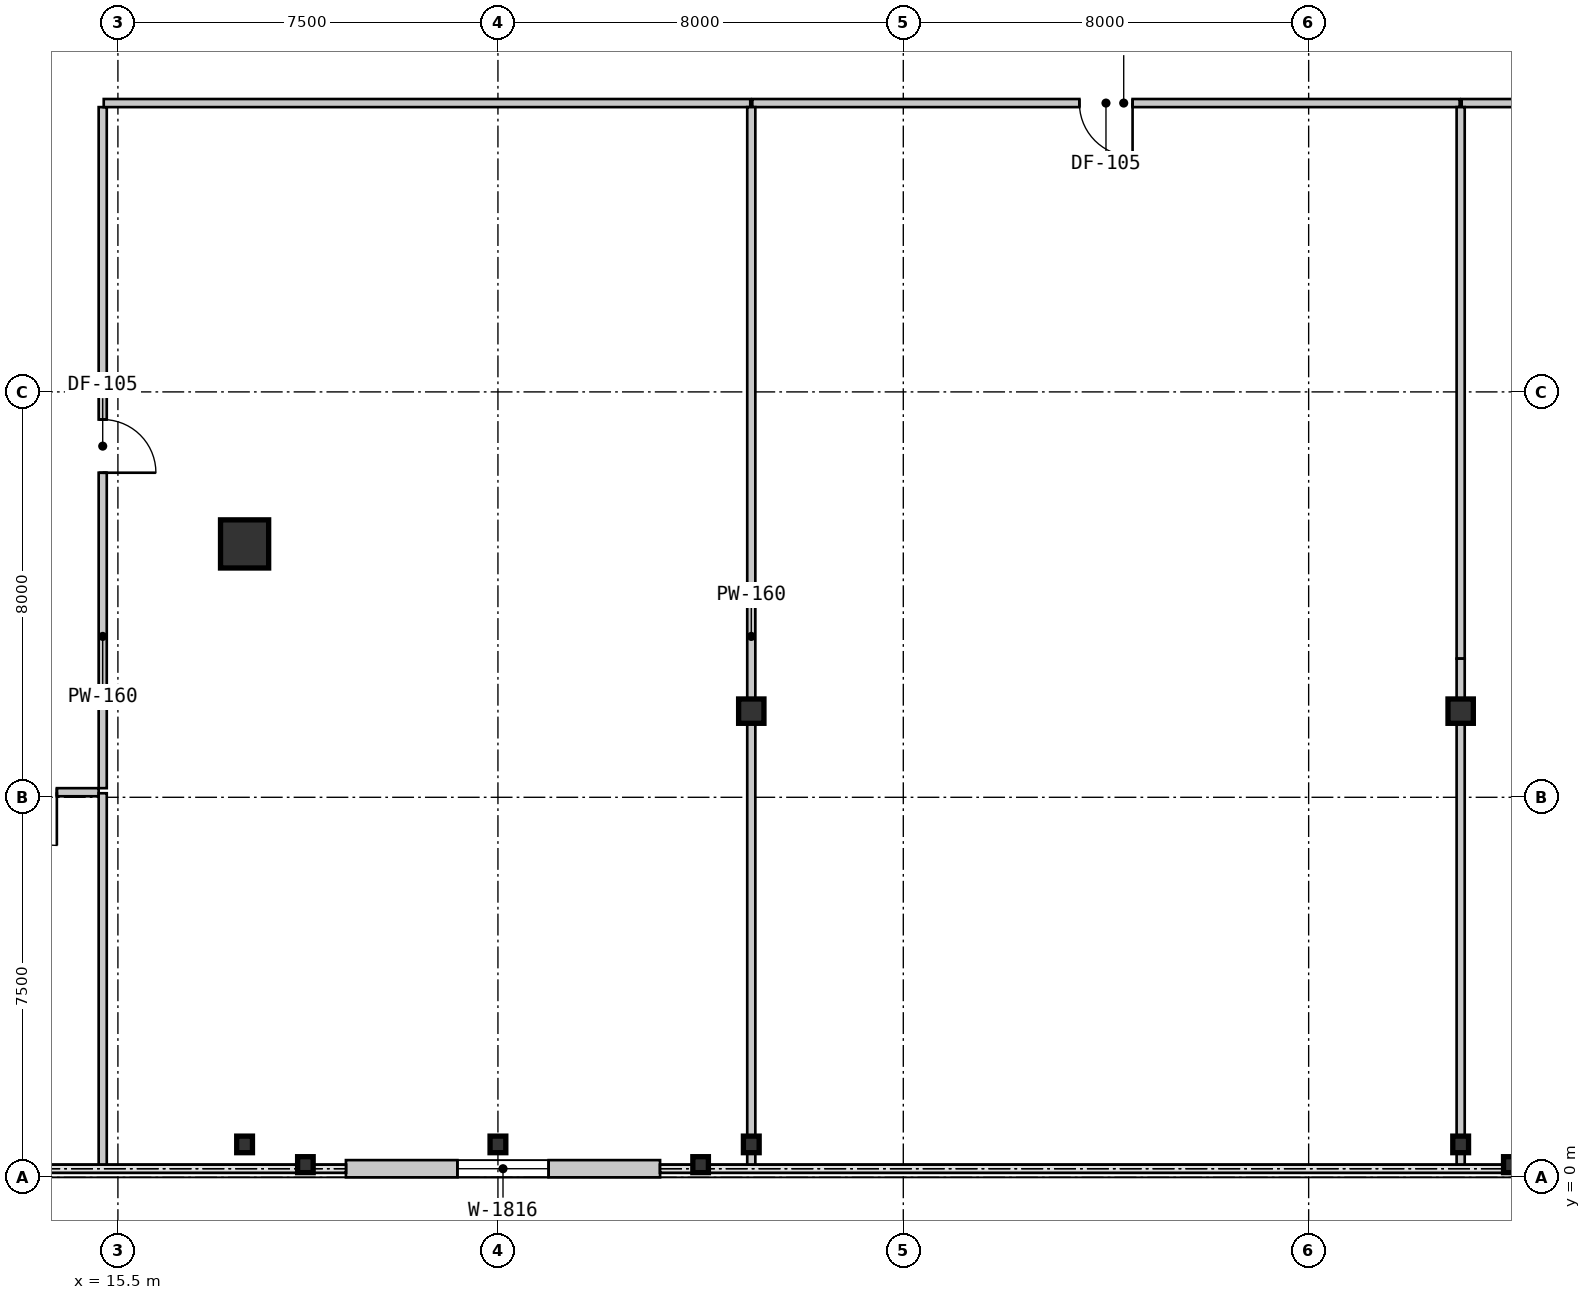
"""IFC4 building model, lengths in metres.
Left out: names, types, materials, properties, quantities, classifications, styles, units other than length and angle.
Written with IfcOpenShell. Run it as: python <this file> out.ifc"""

import sys

from ifc_helpers import new_model, si_unit, direction, frame, frame_2d, origin, origin_2d, place, context, subcontext, project, spatial, rectangle, i_section, extrude, source, transform, mapped, element, fill, save


model = new_model("IFC4")
c1 = context("Model", 3, precision=1e-05, world=origin(), true_north=direction((0.0, 1.0)))
c2 = subcontext(c1, "Body", "Model", "MODEL_VIEW")
j1 = project(units=[si_unit("LENGTHUNIT", "METRE"), si_unit("PLANEANGLEUNIT", "RADIAN")], contexts=[c1])
p1 = place(None, origin())
s1 = spatial("IfcSite", under=j1, at=p1, CompositionType="ELEMENT")
p2 = place(p1, origin())
s2 = spatial("IfcBuilding", under=s1, at=p2, CompositionType="ELEMENT")
p3 = place(p2, frame((0.0, 0.0, 4.55)))
s3 = spatial("IfcBuildingStorey", under=s2, at=p3, CompositionType="ELEMENT", Elevation=4.55)
m1 = source(origin(), c2, "Body", "SweptSolid", [
    extrude(i_section(OverallWidth=0.5, OverallDepth=0.48, WebThickness=0.028, FlangeThickness=0.044, at=origin_2d()), origin(), (0.0, 0.0, 1.0), 3.85),
])
for number, where, z_axis, x_axis in (
    (1, (28.0, 9.2, 0.0), (0.0, 0.0, 1.0), (1.0, 0.0, 0.0)),
    (2, (42.0, 9.2, 0.0), (0.0, 0.0, 1.0), (1.0, 0.0, 0.0)),
):
    element("IfcColumn", number, at=place(p3, frame(where, z_axis=z_axis, x_axis=x_axis)), inside=s3, PredefinedType="COLUMN", context=c2, shape_type="MappedRepresentation", body=[
        mapped(m1, transform((0.0, 0.0, 0.0), scale=1.0)),
    ])
m2 = source(origin(), c2, "Body", "SweptSolid", [
    extrude(rectangle(XDim=0.95, YDim=0.95, at=origin_2d()), origin(), (0.0, 0.0, 1.0), 3.85),
])
p4 = place(p3, frame((18.0, 12.5, 0.0), z_axis=(0.0, 0.0, 1.0), x_axis=(1.0, 0.0, 0.0)))
e3 = element("IfcColumn", 3, at=p4, inside=s3, PredefinedType="COLUMN", context=c2, shape_type="MappedRepresentation", body=[
    mapped(m2, transform((0.0, 0.0, 0.0), scale=1.0)),
])
m3 = source(origin(), c2, "Body", "SweptSolid", [
    extrude(i_section(OverallWidth=0.311, OverallDepth=0.327, WebThickness=0.016, FlangeThickness=0.025, at=origin_2d()), origin(), (0.0, 0.0, 1.0), 3.85),
])
for number, where, z_axis, x_axis in (
    (4, (28.0, 0.65, 0.0), (0.0, 0.0, 1.0), (1.0, 0.0, 0.0)),
    (5, (42.0, 0.65, 0.0), (0.0, 0.0, 1.0), (1.0, 0.0, 0.0)),
    (6, (18.0, 0.65, 0.0), (0.0, 0.0, 1.0), (1.0, 0.0, 0.0)),
    (7, (23.0, 0.65, 0.0), (0.0, 0.0, 1.0), (1.0, 0.0, 0.0)),
):
    element("IfcColumn", number, at=place(p3, frame(where, z_axis=z_axis, x_axis=x_axis)), inside=s3, PredefinedType="COLUMN", context=c2, shape_type="MappedRepresentation", body=[
        mapped(m3, transform((0.0, 0.0, 0.0), scale=1.0)),
    ])
m4 = source(origin(), c2, "Body", "SweptSolid", [
    extrude(i_section(OverallWidth=0.307, OverallDepth=0.315, WebThickness=0.012, FlangeThickness=0.019, at=origin_2d()), origin(), (0.0, 0.0, 1.0), 3.85),
])
for number, where, z_axis, x_axis in (
    (8, (19.2, 0.25, 0.0), (0.0, 0.0, 1.0), (1.0, 0.0, 0.0)),
    (9, (27.0, 0.25, 0.0), (0.0, 0.0, 1.0), (1.0, 0.0, 0.0)),
    (10, (43.0, 0.25, 0.0), (0.0, 0.0, 1.0), (1.0, 0.0, 0.0)),
):
    element("IfcColumn", number, at=place(p3, frame(where, z_axis=z_axis, x_axis=x_axis)), inside=s3, PredefinedType="PILASTER", context=c2, shape_type="MappedRepresentation", body=[
        mapped(m4, transform((0.0, 0.0, 0.0), scale=1.0)),
    ])
m5 = source(origin(), c2, "Body", "SweptSolid", [
    extrude(rectangle(XDim=6.2, YDim=0.34, at=frame_2d((3.1, 0.0))), origin(), (0.0, 0.0, 1.0), 3.59),
])
p5 = place(p3, frame((20.0, 0.17, 0.0), z_axis=(0.0, 0.0, 1.0), x_axis=(1.0, 0.0, 0.0)))
e11 = element("IfcWall", 11, at=p5, inside=s3, PredefinedType="SOLIDWALL", context=c2, shape_type="MappedRepresentation", body=[
    mapped(m5, transform((0.0, 0.0, 0.0), scale=1.0)),
])
m6 = source(origin(), c2, "Body", "SweptSolid", [
    extrude(rectangle(XDim=1.8, YDim=1.6, at=frame_2d((0.9, 0.8))), frame((0.0, 0.18, 0.0), z_axis=(0.0, -1.0, 0.0), x_axis=(1.0, 0.0, 0.0)), (0.0, 0.0, 1.0), 0.36),
])
p6 = place(p5, frame((2.2, 0.0, 0.9)))
e12 = element("IfcOpeningElement", 12, at=p6, cuts=e11, PredefinedType="OPENING", context=c2, shape_type="MappedRepresentation", body=[
    mapped(m6, transform((0.0, 0.0, 0.0), scale=1.0)),
])
m7 = source(origin(), c2, "Body", "SweptSolid", [
    extrude(rectangle(XDim=13.44, YDim=0.16, at=frame_2d((6.72, 0.0))), origin(), (0.0, 0.0, 1.0), 3.59),
])
p7 = place(p3, frame((15.2, 21.12, 0.0), z_axis=(0.0, 0.0, 1.0), x_axis=(0.0, -1.0, 0.0)))
e13 = element("IfcWall", 13, at=p7, inside=s3, PredefinedType="PARTITIONING", context=c2, shape_type="MappedRepresentation", body=[
    mapped(m7, transform((0.0, 0.0, 0.0), scale=1.0)),
])
m8 = source(origin(), c2, "Body", "SweptSolid", [
    extrude(rectangle(XDim=1.05, YDim=2.1, at=frame_2d((0.525, 1.05))), frame((0.0, 0.09, 0.0), z_axis=(0.0, -1.0, 0.0), x_axis=(1.0, 0.0, 0.0)), (0.0, 0.0, 1.0), 0.18),
])
p8 = place(p7, frame((6.165, 0.0, 0.0)))
e14 = element("IfcOpeningElement", 14, at=p8, cuts=e13, PredefinedType="OPENING", context=c2, shape_type="MappedRepresentation", body=[
    mapped(m8, transform((0.0, 0.0, 0.0), scale=1.0)),
])
m9 = source(origin(), c2, "Body", "SweptSolid", [
    extrude(rectangle(XDim=12.76, YDim=0.16, at=frame_2d((6.38, 0.0))), origin(), (0.0, 0.0, 1.0), 3.59),
])
p9 = place(p3, frame((27.98, 21.2, 0.0), z_axis=(0.0, 0.0, 1.0), x_axis=(-1.0, 0.0, 0.0)))
e15 = element("IfcWall", 15, at=p9, inside=s3, PredefinedType="PARTITIONING", context=c2, shape_type="MappedRepresentation", body=[
    mapped(m9, transform((0.0, 0.0, 0.0), scale=1.0)),
])
m10 = source(origin(), c2, "Body", "SweptSolid", [
    extrude(rectangle(XDim=13.959, YDim=0.16, at=frame_2d((6.98, 0.0))), origin(), (0.0, 0.0, 1.0), 3.59),
])
p10 = place(p3, frame((41.98, 21.2, 0.0), z_axis=(0.0, 0.0, 1.0), x_axis=(-1.0, 0.0, 0.0)))
e16 = element("IfcWall", 16, at=p10, inside=s3, PredefinedType="PARTITIONING", context=c2, shape_type="MappedRepresentation", body=[
    mapped(m10, transform((0.0, 0.0, 0.0), scale=1.0)),
])
p11 = place(p10, frame((6.455, 0.0, 0.0)))
e17 = element("IfcOpeningElement", 17, at=p11, cuts=e16, PredefinedType="OPENING", context=c2, shape_type="MappedRepresentation", body=[
    mapped(m8, transform((0.0, 0.0, 0.0), scale=1.0)),
])
m11 = source(origin(), c2, "Body", "SweptSolid", [
    extrude(rectangle(XDim=13.459, YDim=0.16, at=frame_2d((6.73, 0.0))), origin(), (0.0, 0.0, 1.0), 3.59),
])
p12 = place(p3, frame((55.48, 21.2, 0.0), z_axis=(0.0, 0.0, 1.0), x_axis=(-1.0, 0.0, 0.0)))
e18 = element("IfcWall", 18, at=p12, inside=s3, PredefinedType="PARTITIONING", context=c2, shape_type="MappedRepresentation", body=[
    mapped(m11, transform((0.0, 0.0, 0.0), scale=1.0)),
])
m12 = source(origin(), c2, "Body", "SweptSolid", [
    extrude(rectangle(XDim=2.67, YDim=0.16, at=frame_2d((1.335, 0.0))), origin(), (0.0, 0.0, 1.0), 3.59),
])
p13 = place(p3, frame((15.12, 7.6, 0.0), z_axis=(0.0, 0.0, 1.0), x_axis=(-1.0, 0.0, 0.0)))
e19 = element("IfcWall", 19, at=p13, inside=s3, PredefinedType="PARTITIONING", context=c2, shape_type="MappedRepresentation", body=[
    mapped(m12, transform((0.0, 0.0, 0.0), scale=1.0)),
])
p14 = place(p13, frame((0.825, 0.0, 0.0)))
e20 = element("IfcOpeningElement", 20, at=p14, cuts=e19, PredefinedType="OPENING", context=c2, shape_type="MappedRepresentation", body=[
    mapped(m8, transform((0.0, 0.0, 0.0), scale=1.0)),
])
m13 = source(origin(), c2, "Body", "SweptSolid", [
    extrude(rectangle(XDim=11.92, YDim=0.16, at=frame_2d((5.96, 0.0))), origin(), (0.0, 0.0, 1.0), 2.988),
])
p15 = place(p3, frame((28.0, 21.12, 0.0), z_axis=(0.0, 0.0, 1.0), x_axis=(0.0, -1.0, 0.0)))
e21 = element("IfcWall", 21, at=p15, inside=s3, PredefinedType="PARTITIONING", context=c2, shape_type="MappedRepresentation", body=[
    mapped(m13, transform((0.0, 0.0, 0.0), scale=1.0)),
])
m14 = source(origin(), c2, "Body", "SweptSolid", [
    extrude(rectangle(XDim=8.55, YDim=0.16, at=frame_2d((4.275, 0.0))), origin(), (0.0, 0.0, 1.0), 3.057),
])
p16 = place(p3, frame((28.0, 9.2, 0.0), z_axis=(0.0, 0.0, 1.0), x_axis=(0.0, -1.0, 0.0)))
e22 = element("IfcWall", 22, at=p16, inside=s3, PredefinedType="PARTITIONING", context=c2, shape_type="MappedRepresentation", body=[
    mapped(m14, transform((0.0, 0.0, 0.0), scale=1.0)),
])
m15 = source(origin(), c2, "Body", "SweptSolid", [
    extrude(rectangle(XDim=0.42, YDim=0.16, at=frame_2d((0.21, 0.0))), origin(), (0.0, 0.0, 1.0), 3.59),
])
p17 = place(p3, frame((28.0, 0.65, 0.0), z_axis=(0.0, 0.0, 1.0), x_axis=(0.0, -1.0, 0.0)))
e23 = element("IfcWall", 23, at=p17, inside=s3, PredefinedType="PARTITIONING", context=c2, shape_type="MappedRepresentation", body=[
    mapped(m15, transform((0.0, 0.0, 0.0), scale=1.0)),
])
m16 = source(origin(), c2, "Body", "SweptSolid", [
    extrude(rectangle(XDim=7.35, YDim=0.16, at=frame_2d((3.675, 0.0))), origin(), (0.0, 0.0, 1.0), 3.59),
])
p18 = place(p3, frame((15.2, 0.23, 0.0), z_axis=(0.0, 0.0, 1.0), x_axis=(0.0, 1.0, 0.0)))
e24 = element("IfcWall", 24, at=p18, inside=s3, PredefinedType="PARTITIONING", context=c2, shape_type="MappedRepresentation", body=[
    mapped(m16, transform((0.0, 0.0, 0.0), scale=1.0)),
])
m17 = source(origin(), c2, "Body", "SweptSolid", [
    extrude(rectangle(XDim=10.884, YDim=0.16, at=frame_2d((5.442, 0.0))), origin(), (0.0, 0.0, 1.0), 3.59),
])
p19 = place(p3, frame((42.0, 21.12, 0.0), z_axis=(0.0, 0.0, 1.0), x_axis=(0.0, -1.0, 0.0)))
e25 = element("IfcWall", 25, at=p19, inside=s3, PredefinedType="PARTITIONING", context=c2, shape_type="MappedRepresentation", body=[
    mapped(m17, transform((0.0, 0.0, 0.0), scale=1.0)),
])
m18 = source(origin(), c2, "Body", "SweptSolid", [
    extrude(rectangle(XDim=1.051, YDim=0.16, at=frame_2d((0.526, 0.0))), origin(), (0.0, 0.0, 1.0), 2.988),
])
p20 = place(p3, frame((42.0, 10.236, 0.0), z_axis=(0.0, 0.0, 1.0), x_axis=(0.0, -1.0, 0.0)))
e26 = element("IfcWall", 26, at=p20, inside=s3, PredefinedType="PARTITIONING", context=c2, shape_type="MappedRepresentation", body=[
    mapped(m18, transform((0.0, 0.0, 0.0), scale=1.0)),
])
m19 = source(origin(), c2, "Body", "SweptSolid", [
    extrude(rectangle(XDim=8.535, YDim=0.16, at=frame_2d((4.268, 0.0))), origin(), (0.0, 0.0, 1.0), 3.057),
])
p21 = place(p3, frame((42.0, 9.185, 0.0), z_axis=(0.0, 0.0, 1.0), x_axis=(0.0, -1.0, 0.0)))
e27 = element("IfcWall", 27, at=p21, inside=s3, PredefinedType="PARTITIONING", context=c2, shape_type="MappedRepresentation", body=[
    mapped(m19, transform((0.0, 0.0, 0.0), scale=1.0)),
])
p22 = place(p3, frame((42.0, 0.65, 0.0), z_axis=(0.0, 0.0, 1.0), x_axis=(0.0, -1.0, 0.0)))
e28 = element("IfcWall", 28, at=p22, inside=s3, PredefinedType="PARTITIONING", context=c2, shape_type="MappedRepresentation", body=[
    mapped(m15, transform((0.0, 0.0, 0.0), scale=1.0)),
])
m20 = source(origin(), c2, "Body", "SweptSolid", [
    extrude(rectangle(XDim=1.8, YDim=1.6, at=frame_2d((0.9, 0.8))), frame((0.0, 0.03, 0.0), z_axis=(0.0, -1.0, 0.0), x_axis=(1.0, 0.0, 0.0)), (0.0, 0.0, 1.0), 0.06),
])
p23 = place(p6, origin())
e29 = element("IfcWindow", 29, at=p23, inside=s3, PartitioningType="SINGLE_PANEL", PredefinedType="WINDOW", context=c2, shape_type="MappedRepresentation", body=[
    mapped(m20, transform((0.0, 0.0, 0.0), scale=1.0)),
])
fill(e12, e29)
m21 = source(origin(), c2, "Body", "SweptSolid", [
    extrude(rectangle(XDim=1.05, YDim=2.1, at=frame_2d((0.525, 1.05))), frame((0.0, 0.025, 0.0), z_axis=(0.0, -1.0, 0.0), x_axis=(1.0, 0.0, 0.0)), (0.0, 0.0, 1.0), 0.05),
])
p24 = place(p8, origin())
e30 = element("IfcDoor", 30, at=p24, inside=s3, OperationType="SINGLE_SWING_RIGHT", PredefinedType="DOOR", context=c2, shape_type="MappedRepresentation", body=[
    mapped(m21, transform((0.0, 0.0, 0.0), scale=1.0)),
])
fill(e14, e30)
p25 = place(p11, origin())
e31 = element("IfcDoor", 31, at=p25, inside=s3, OperationType="SINGLE_SWING_LEFT", PredefinedType="DOOR", context=c2, shape_type="MappedRepresentation", body=[
    mapped(m21, transform((0.0, 0.0, 0.0), scale=1.0)),
])
fill(e17, e31)
p26 = place(p14, origin())
e32 = element("IfcDoor", 32, at=p26, inside=s3, OperationType="SINGLE_SWING_LEFT", PredefinedType="DOOR", context=c2, shape_type="MappedRepresentation", body=[
    mapped(m21, transform((0.0, 0.0, 0.0), scale=1.0)),
])
fill(e20, e32)
save(model, sys.argv[1])
